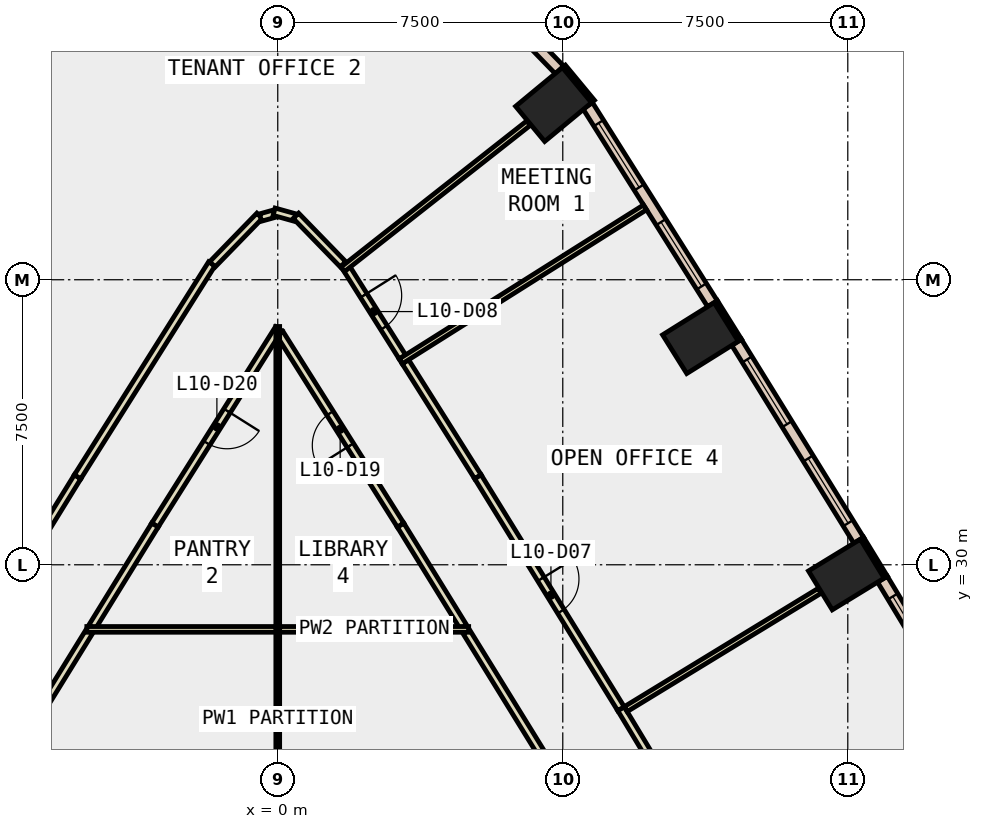
"""IFC4 building model, lengths in metres.
Left out: names, types, materials, properties, quantities, classifications, styles, units other than length and angle.
Written with IfcOpenShell. Run it as: python <this file> out.ifc"""

import sys

from ifc_helpers import new_model, si_unit, direction, frame, frame_2d, origin, origin_2d, place, context, subcontext, project, spatial, rectangle, extrude, element, fill, save


model = new_model("IFC4")
c1 = context("Model", 3, precision=1e-05, world=origin(), true_north=direction((0.0, 1.0)))
c2 = subcontext(c1, "Body", "Model", "MODEL_VIEW")
j1 = project(units=[si_unit("LENGTHUNIT", "METRE"), si_unit("PLANEANGLEUNIT", "RADIAN")], contexts=[c1])
p1 = place(None, origin())
s1 = spatial("IfcSite", under=j1, at=p1, CompositionType="ELEMENT")
p2 = place(p1, origin())
s2 = spatial("IfcBuilding", under=s1, at=p2, CompositionType="ELEMENT")
p3 = place(p2, frame((0.0, 0.0, 51.8)))
s3 = spatial("IfcBuildingStorey", under=s2, at=p3, CompositionType="ELEMENT", Elevation=51.8)
for number, where, z_axis, x_axis in (
    (1, (14.961, 29.743, -0.4), (0.0, 0.0, 1.0), (-0.522, 0.853, 0.0)),
    (2, (11.123, 35.965, -0.4), (0.0, 0.0, 1.0), (-0.53, 0.848, 0.0)),
    (3, (7.258, 42.111, -0.4), (0.0, 0.0, 1.0), (-0.638, 0.77, 0.0)),
):
    element("IfcColumn", number, at=place(p3, frame(where, z_axis=z_axis, x_axis=x_axis)), inside=s3, PredefinedType="COLUMN", context=c2, shape_type="SweptSolid", body=[
        extrude(rectangle(XDim=1.2, YDim=1.6, at=origin_2d()), origin(), (0.0, 0.0, 1.0), 4.2),
    ])
p4 = place(p3, frame((15.999, 29.674, 0.0), z_axis=(0.0, 0.0, 1.0), x_axis=(-0.521598117945, 0.853191305251, 0.0)))
e4 = element("IfcWall", 4, at=p4, inside=s3, PredefinedType="STANDARD", context=c2, shape_type="SweptSolid", body=[
    extrude(rectangle(XDim=1.2, YDim=0.1, at=frame_2d((0.6, 0.0))), origin(), (0.0, 0.0, 1.0), 3.8),
])
p5 = place(p3, frame((12.162, 35.907, 0.0), z_axis=(0.0, 0.0, 1.0), x_axis=(-0.530328162925, 0.847792450785, 0.0)))
e5 = element("IfcWall", 5, at=p5, inside=s3, PredefinedType="STANDARD", context=c2, shape_type="SweptSolid", body=[
    extrude(rectangle(XDim=1.2, YDim=0.1, at=frame_2d((0.6, 0.0))), origin(), (0.0, 0.0, 1.0), 3.8),
])
p6 = place(p3, frame((8.295, 42.191, 0.0), z_axis=(0.0, 0.0, 1.0), x_axis=(-0.637638520791, 0.770335716947, 0.0)))
e6 = element("IfcWall", 6, at=p6, inside=s3, PredefinedType="STANDARD", context=c2, shape_type="SweptSolid", body=[
    extrude(rectangle(XDim=1.199, YDim=0.1, at=frame_2d((0.6, 0.0))), origin(), (0.0, 0.0, 1.0), 3.8),
])
p7 = place(p3, frame((19.074, 24.38, 0.0), z_axis=(0.0, 0.0, 1.0), x_axis=(-0.516699243123, 0.856166976796, 0.0)))
e7 = element("IfcWall", 7, at=p7, inside=s3, PredefinedType="STANDARD", context=c2, shape_type="SweptSolid", body=[
    extrude(rectangle(XDim=6.122, YDim=0.3, at=frame_2d((3.061, 0.0))), origin(), (0.0, 0.0, 1.0), 3.8),
])
p8 = place(p7, frame((0.53, 0.0, 0.9)))
e8 = element("IfcOpeningElement", 8, at=p8, cuts=e7, PredefinedType="OPENING", context=c2, shape_type="SweptSolid", body=[
    extrude(rectangle(XDim=2.0, YDim=2.6, at=frame_2d((1.0, 1.3))), frame((0.0, 0.16, 0.0), z_axis=(0.0, -1.0, 0.0), x_axis=(1.0, 0.0, 0.0)), (0.0, 0.0, 1.0), 0.32),
])
p9 = place(p7, frame((3.591, 0.0, 0.9)))
e9 = element("IfcOpeningElement", 9, at=p9, cuts=e7, PredefinedType="OPENING", context=c2, shape_type="SweptSolid", body=[
    extrude(rectangle(XDim=2.0, YDim=2.6, at=frame_2d((1.0, 1.3))), frame((0.0, 0.16, 0.0), z_axis=(0.0, -1.0, 0.0), x_axis=(1.0, 0.0, 0.0)), (0.0, 0.0, 1.0), 0.32),
])
p10 = place(p3, frame((15.287, 30.644, 0.0), z_axis=(0.0, 0.0, 1.0), x_axis=(-0.525114088226, 0.851031840971, 0.0)))
e10 = element("IfcWall", 10, at=p10, inside=s3, PredefinedType="STANDARD", context=c2, shape_type="SweptSolid", body=[
    extrude(rectangle(XDim=6.121, YDim=0.3, at=frame_2d((3.061, 0.0))), origin(), (0.0, 0.0, 1.0), 3.8),
])
p11 = place(p10, frame((0.53, 0.0, 0.9)))
e11 = element("IfcOpeningElement", 11, at=p11, cuts=e10, PredefinedType="OPENING", context=c2, shape_type="SweptSolid", body=[
    extrude(rectangle(XDim=2.0, YDim=2.6, at=frame_2d((1.0, 1.3))), frame((0.0, 0.16, 0.0), z_axis=(0.0, -1.0, 0.0), x_axis=(1.0, 0.0, 0.0)), (0.0, 0.0, 1.0), 0.32),
])
p12 = place(p10, frame((3.591, 0.0, 0.9)))
e12 = element("IfcOpeningElement", 12, at=p12, cuts=e10, PredefinedType="OPENING", context=c2, shape_type="SweptSolid", body=[
    extrude(rectangle(XDim=2.0, YDim=2.6, at=frame_2d((1.0, 1.3))), frame((0.0, 0.16, 0.0), z_axis=(0.0, -1.0, 0.0), x_axis=(1.0, 0.0, 0.0)), (0.0, 0.0, 1.0), 0.32),
])
p13 = place(p3, frame((11.439, 36.869, 0.0), z_axis=(0.0, 0.0, 1.0), x_axis=(-0.533075127321, 0.846067910177, 0.0)))
e13 = element("IfcWall", 13, at=p13, inside=s3, PredefinedType="STANDARD", context=c2, shape_type="SweptSolid", body=[
    extrude(rectangle(XDim=6.157, YDim=0.3, at=frame_2d((3.078, 0.0))), origin(), (0.0, 0.0, 1.0), 3.8),
])
p14 = place(p13, frame((0.539, 0.0, 0.9)))
e14 = element("IfcOpeningElement", 14, at=p14, cuts=e13, PredefinedType="OPENING", context=c2, shape_type="SweptSolid", body=[
    extrude(rectangle(XDim=2.0, YDim=2.6, at=frame_2d((1.0, 1.3))), frame((0.0, 0.16, 0.0), z_axis=(0.0, -1.0, 0.0), x_axis=(1.0, 0.0, 0.0)), (0.0, 0.0, 1.0), 0.32),
])
p15 = place(p13, frame((3.618, 0.0, 0.9)))
e15 = element("IfcOpeningElement", 15, at=p15, cuts=e13, PredefinedType="OPENING", context=c2, shape_type="SweptSolid", body=[
    extrude(rectangle(XDim=2.0, YDim=2.6, at=frame_2d((1.0, 1.3))), frame((0.0, 0.16, 0.0), z_axis=(0.0, -1.0, 0.0), x_axis=(1.0, 0.0, 0.0)), (0.0, 0.0, 1.0), 0.32),
])
p16 = place(p3, frame((7.416, 43.02, 0.0), z_axis=(0.0, 0.0, 1.0), x_axis=(-0.696939827977, 0.717129609052, 0.0)))
e16 = element("IfcWall", 16, at=p16, inside=s3, PredefinedType="STANDARD", context=c2, shape_type="SweptSolid", body=[
    extrude(rectangle(XDim=3.422, YDim=0.3, at=frame_2d((1.711, 0.0))), origin(), (0.0, 0.0, 1.0), 3.8),
])
p17 = place(p16, frame((1.011, 0.0, 0.9)))
e17 = element("IfcOpeningElement", 17, at=p17, cuts=e16, PredefinedType="OPENING", context=c2, shape_type="SweptSolid", body=[
    extrude(rectangle(XDim=1.4, YDim=2.6, at=frame_2d((0.7, 1.3))), frame((0.0, 0.16, 0.0), z_axis=(0.0, -1.0, 0.0), x_axis=(1.0, 0.0, 0.0)), (0.0, 0.0, 1.0), 0.32),
])
p18 = place(p3, frame((-5.031, 45.474, 0.0), z_axis=(0.0, 0.0, 1.0), x_axis=(-0.696939827977, -0.717129609052, 0.0)))
e18 = element("IfcWall", 18, at=p18, inside=s3, PredefinedType="STANDARD", context=c2, shape_type="SweptSolid", body=[
    extrude(rectangle(XDim=3.422, YDim=0.3, at=frame_2d((1.711, 0.0))), origin(), (0.0, 0.0, 1.0), 3.8),
])
p19 = place(p18, frame((1.011, 0.0, 0.9)))
e19 = element("IfcOpeningElement", 19, at=p19, cuts=e18, PredefinedType="OPENING", context=c2, shape_type="SweptSolid", body=[
    extrude(rectangle(XDim=1.4, YDim=2.6, at=frame_2d((0.7, 1.3))), frame((0.0, 0.16, 0.0), z_axis=(0.0, -1.0, 0.0), x_axis=(1.0, 0.0, 0.0)), (0.0, 0.0, 1.0), 0.32),
])
for number, where, z_axis, x_axis in (
    (20, (7.022, 24.899, 0.0), (0.0, 0.0, 1.0), (-0.525, 0.851, 0.0)),
    (21, (-4.963, 28.236, 0.0), (0.0, 0.0, 1.0), (-0.525, -0.851, 0.0)),
):
    element("IfcWall", number, at=place(p3, frame(where, z_axis=z_axis, x_axis=x_axis)), inside=s3, PredefinedType="PARTITIONING", context=c2, shape_type="SweptSolid", body=[
        extrude(rectangle(XDim=3.921, YDim=0.2, at=frame_2d((1.961, 0.0))), origin(), (0.0, 0.0, 1.0), 3.8),
    ])
p20 = place(p3, frame((4.885, 28.364, 0.0), z_axis=(0.0, 0.0, 1.0), x_axis=(-0.525078663571, 0.851053698107, 0.0)))
e22 = element("IfcWall", 22, at=p20, inside=s3, PredefinedType="PARTITIONING", context=c2, shape_type="SweptSolid", body=[
    extrude(rectangle(XDim=3.15, YDim=0.2, at=frame_2d((1.575, 0.0))), origin(), (0.0, 0.0, 1.0), 3.8),
])
p21 = place(p3, frame((3.231, 31.045, 0.0), z_axis=(0.0, 0.0, 1.0), x_axis=(-0.533294550084, 0.845929620507, 0.0)))
e23 = element("IfcWall", 23, at=p21, inside=s3, PredefinedType="PARTITIONING", context=c2, shape_type="SweptSolid", body=[
    extrude(rectangle(XDim=5.959, YDim=0.2, at=frame_2d((2.979, 0.0))), origin(), (0.0, 0.0, 1.0), 3.8),
])
p22 = place(p21, frame((2.479, 0.0, 0.0)))
e24 = element("IfcOpeningElement", 24, at=p22, cuts=e23, PredefinedType="OPENING", context=c2, shape_type="SweptSolid", body=[
    extrude(rectangle(XDim=1.0, YDim=2.1, at=frame_2d((0.5, 1.05))), frame((0.0, 0.11, 0.0), z_axis=(0.0, -1.0, 0.0), x_axis=(1.0, 0.0, 0.0)), (0.0, 0.0, 1.0), 0.22),
])
p23 = place(p3, frame((0.027, 36.213, 0.0), z_axis=(0.0, 0.0, 1.0), x_axis=(-0.533299680037, -0.845926386438, 0.0)))
e25 = element("IfcWall", 25, at=p23, inside=s3, PredefinedType="PARTITIONING", context=c2, shape_type="SweptSolid", body=[
    extrude(rectangle(XDim=6.109, YDim=0.2, at=frame_2d((3.055, 0.0))), origin(), (0.0, 0.0, 1.0), 3.8),
])
p24 = place(p23, frame((2.554, 0.0, 0.0)))
e26 = element("IfcOpeningElement", 26, at=p24, cuts=e25, PredefinedType="OPENING", context=c2, shape_type="SweptSolid", body=[
    extrude(rectangle(XDim=1.0, YDim=2.1, at=frame_2d((0.5, 1.05))), frame((0.0, 0.11, 0.0), z_axis=(0.0, -1.0, 0.0), x_axis=(1.0, 0.0, 0.0)), (0.0, 0.0, 1.0), 0.22),
])
p25 = place(p3, frame((-3.231, 31.045, 0.0), z_axis=(0.0, 0.0, 1.0), x_axis=(-0.525078663571, -0.851053698107, 0.0)))
e27 = element("IfcWall", 27, at=p25, inside=s3, PredefinedType="PARTITIONING", context=c2, shape_type="SweptSolid", body=[
    extrude(rectangle(XDim=3.15, YDim=0.2, at=frame_2d((1.575, 0.0))), origin(), (0.0, 0.0, 1.0), 3.8),
])
p26 = place(p3, frame((9.032, 26.213, 0.0), z_axis=(0.0, 0.0, 1.0), x_axis=(0.516789314756, -0.856112611841, 0.0)))
e28 = element("IfcWall", 28, at=p26, inside=s3, PredefinedType="PARTITIONING", context=c2, shape_type="SweptSolid", body=[
    extrude(rectangle(XDim=7.32, YDim=0.2, at=frame_2d((3.66, 0.0))), origin(), (0.0, 0.0, 1.0), 3.8),
])
p27 = place(p26, frame((3.16, 0.0, 0.0)))
e29 = element("IfcOpeningElement", 29, at=p27, cuts=e28, PredefinedType="OPENING", context=c2, shape_type="SweptSolid", body=[
    extrude(rectangle(XDim=1.0, YDim=2.1, at=frame_2d((0.5, 1.05))), frame((0.0, 0.11, 0.0), z_axis=(0.0, -1.0, 0.0), x_axis=(1.0, 0.0, 0.0)), (0.0, 0.0, 1.0), 0.22),
])
p28 = place(p3, frame((3.359, 35.341, 0.0), z_axis=(0.0, 0.0, 1.0), x_axis=(0.533386910893, -0.845871386966, 0.0)))
e30 = element("IfcWall", 30, at=p28, inside=s3, PredefinedType="PARTITIONING", context=c2, shape_type="SweptSolid", body=[
    extrude(rectangle(XDim=3.578, YDim=0.2, at=frame_2d((1.789, 0.0))), origin(), (0.0, 0.0, 1.0), 3.8),
])
p29 = place(p3, frame((5.267, 32.315, 0.0), z_axis=(0.0, 0.0, 1.0), x_axis=(0.524988204957, -0.851109502153, 0.0)))
e31 = element("IfcWall", 31, at=p29, inside=s3, PredefinedType="PARTITIONING", context=c2, shape_type="SweptSolid", body=[
    extrude(rectangle(XDim=7.169, YDim=0.2, at=frame_2d((3.585, 0.0))), origin(), (0.0, 0.0, 1.0), 3.8),
])
p30 = place(p29, frame((3.16, 0.0, 0.0)))
e32 = element("IfcOpeningElement", 32, at=p30, cuts=e31, PredefinedType="OPENING", context=c2, shape_type="SweptSolid", body=[
    extrude(rectangle(XDim=1.0, YDim=2.1, at=frame_2d((0.5, 1.05))), frame((0.0, 0.11, 0.0), z_axis=(0.0, -1.0, 0.0), x_axis=(1.0, 0.0, 0.0)), (0.0, 0.0, 1.0), 0.22),
])
p31 = place(p3, frame((1.775, 37.856, 0.0), z_axis=(0.0, 0.0, 1.0), x_axis=(0.533221537001, -0.845975645322, 0.0)))
e33 = element("IfcWall", 33, at=p31, inside=s3, PredefinedType="PARTITIONING", context=c2, shape_type="SweptSolid", body=[
    extrude(rectangle(XDim=2.823, YDim=0.2, at=frame_2d((1.411, 0.0))), origin(), (0.0, 0.0, 1.0), 3.8),
])
p32 = place(p31, frame((0.911, 0.0, 0.0)))
e34 = element("IfcOpeningElement", 34, at=p32, cuts=e33, PredefinedType="OPENING", context=c2, shape_type="SweptSolid", body=[
    extrude(rectangle(XDim=1.0, YDim=2.1, at=frame_2d((0.5, 1.05))), frame((0.0, 0.11, 0.0), z_axis=(0.0, -1.0, 0.0), x_axis=(1.0, 0.0, 0.0)), (0.0, 0.0, 1.0), 0.22),
])
p33 = place(p3, frame((-9.11, 26.085, 0.0), z_axis=(0.0, 0.0, 1.0), x_axis=(0.525007100846, 0.85109784635, 0.0)))
e35 = element("IfcWall", 35, at=p33, inside=s3, PredefinedType="PARTITIONING", context=c2, shape_type="SweptSolid", body=[
    extrude(rectangle(XDim=7.32, YDim=0.2, at=frame_2d((3.66, 0.0))), origin(), (0.0, 0.0, 1.0), 3.8),
])
p34 = place(p33, frame((3.16, 0.0, 0.0)))
e36 = element("IfcOpeningElement", 36, at=p34, cuts=e35, PredefinedType="OPENING", context=c2, shape_type="SweptSolid", body=[
    extrude(rectangle(XDim=1.0, YDim=2.1, at=frame_2d((0.5, 1.05))), frame((0.0, 0.11, 0.0), z_axis=(0.0, -1.0, 0.0), x_axis=(1.0, 0.0, 0.0)), (0.0, 0.0, 1.0), 0.22),
])
p35 = place(p3, frame((-5.267, 32.315, 0.0), z_axis=(0.0, 0.0, 1.0), x_axis=(0.533195424135, 0.845992103794, 0.0)))
e37 = element("IfcWall", 37, at=p35, inside=s3, PredefinedType="PARTITIONING", context=c2, shape_type="SweptSolid", body=[
    extrude(rectangle(XDim=6.624, YDim=0.2, at=frame_2d((3.312, 0.0))), origin(), (0.0, 0.0, 1.0), 3.8),
])
p36 = place(p3, frame((-1.718, 37.906, 0.0), z_axis=(0.0, 0.0, 1.0), x_axis=(0.696949052806, 0.71712064382, 0.0)))
e38 = element("IfcWall", 38, at=p36, inside=s3, PredefinedType="PARTITIONING", context=c2, shape_type="SweptSolid", body=[
    extrude(rectangle(XDim=1.779, YDim=0.2, at=frame_2d((0.89, 0.0))), origin(), (0.0, 0.0, 1.0), 3.8),
])
p37 = place(p3, frame((-0.452, 39.137, 0.0), z_axis=(0.0, 0.0, 1.0), x_axis=(0.963347325023, 0.26825721122, 0.0)))
e39 = element("IfcWall", 39, at=p37, inside=s3, PredefinedType="PARTITIONING", context=c2, shape_type="SweptSolid", body=[
    extrude(rectangle(XDim=0.369, YDim=0.2, at=frame_2d((0.185, 0.0))), origin(), (0.0, 0.0, 1.0), 3.8),
])
p38 = place(p3, frame((-0.096, 39.29, 0.0), z_axis=(0.0, 0.0, 1.0), x_axis=(0.963110974003, -0.269104536854, 0.0)))
e40 = element("IfcWall", 40, at=p38, inside=s3, PredefinedType="PARTITIONING", context=c2, shape_type="SweptSolid", body=[
    extrude(rectangle(XDim=0.569, YDim=0.2, at=frame_2d((0.284, 0.0))), origin(), (0.0, 0.0, 1.0), 3.8),
])
p39 = place(p3, frame((0.478, 39.182, 0.0), z_axis=(0.0, 0.0, 1.0), x_axis=(0.696949052806, -0.71712064382, 0.0)))
e41 = element("IfcWall", 41, at=p39, inside=s3, PredefinedType="PARTITIONING", context=c2, shape_type="SweptSolid", body=[
    extrude(rectangle(XDim=1.779, YDim=0.2, at=frame_2d((0.89, 0.0))), origin(), (0.0, 0.0, 1.0), 3.8),
])
p40 = place(p3, frame((0.0, 23.5, 0.0), z_axis=(0.0, 0.0, 1.0), x_axis=(0.0, 1.0, 0.0)))
e42 = element("IfcWall", 42, at=p40, inside=s3, PredefinedType="PARTITIONING", context=c2, shape_type="SweptSolid", body=[
    extrude(rectangle(XDim=4.875, YDim=0.1, at=frame_2d((2.438, 0.0))), origin(), (0.0, 0.0, 1.0), 3.8),
])
for number, where, z_axis, x_axis in (
    (43, (0.05, 28.3, 0.0), (0.0, 0.0, 1.0), (1.0, 0.0, 0.0)),
    (44, (-5.024, 28.3, 0.0), (0.0, 0.0, 1.0), (1.0, 0.0, 0.0)),
):
    element("IfcWall", number, at=place(p3, frame(where, z_axis=z_axis, x_axis=x_axis)), inside=s3, PredefinedType="PARTITIONING", context=c2, shape_type="SweptSolid", body=[
        extrude(rectangle(XDim=4.974, YDim=0.15, at=frame_2d((2.487, 0.0))), origin(), (0.0, 0.0, 1.0), 3.8),
    ])
p41 = place(p3, frame((0.0, 28.375, 0.0), z_axis=(0.0, 0.0, 1.0), x_axis=(0.0, 1.0, 0.0)))
e45 = element("IfcWall", 45, at=p41, inside=s3, PredefinedType="PARTITIONING", context=c2, shape_type="SweptSolid", body=[
    extrude(rectangle(XDim=7.895, YDim=0.1, at=frame_2d((3.948, 0.0))), origin(), (0.0, 0.0, 1.0), 3.8),
])
p42 = place(p3, frame((9.156, 26.201, 0.0), z_axis=(0.0, 0.0, 1.0), x_axis=(0.853632819511, 0.520875234057, 0.0)))
e46 = element("IfcWall", 46, at=p42, inside=s3, PredefinedType="PARTITIONING", context=c2, shape_type="SweptSolid", body=[
    extrude(rectangle(XDim=5.98, YDim=0.15, at=frame_2d((2.99, 0.0))), origin(), (0.0, 0.0, 1.0), 3.8),
])
p43 = place(p3, frame((3.235, 35.352, 0.0), z_axis=(0.0, 0.0, 1.0), x_axis=(0.845987036055, 0.533203464755, 0.0)))
e47 = element("IfcWall", 47, at=p43, inside=s3, PredefinedType="PARTITIONING", context=c2, shape_type="SweptSolid", body=[
    extrude(rectangle(XDim=7.599, YDim=0.15, at=frame_2d((3.8, 0.0))), origin(), (0.0, 0.0, 1.0), 3.8),
])
p44 = place(p3, frame((1.709, 37.773, 0.0), z_axis=(0.0, 0.0, 1.0), x_axis=(0.785857956092, 0.618407044629, 0.0)))
e48 = element("IfcWall", 48, at=p44, inside=s3, PredefinedType="PARTITIONING", context=c2, shape_type="SweptSolid", body=[
    extrude(rectangle(XDim=6.223, YDim=0.15, at=frame_2d((3.111, 0.0))), origin(), (0.0, 0.0, 1.0), 3.8),
])
p45 = place(p9, origin())
e49 = element("IfcWindow", 49, at=p45, inside=s3, PartitioningType="SINGLE_PANEL", PredefinedType="WINDOW", context=c2, shape_type="SweptSolid", body=[
    extrude(rectangle(XDim=2.0, YDim=2.6, at=frame_2d((1.0, 1.3))), frame((0.0, 0.03, 0.0), z_axis=(0.0, -1.0, 0.0), x_axis=(1.0, 0.0, 0.0)), (0.0, 0.0, 1.0), 0.06),
])
fill(e9, e49)
p46 = place(p11, origin())
e50 = element("IfcWindow", 50, at=p46, inside=s3, PartitioningType="SINGLE_PANEL", PredefinedType="WINDOW", context=c2, shape_type="SweptSolid", body=[
    extrude(rectangle(XDim=2.0, YDim=2.6, at=frame_2d((1.0, 1.3))), frame((0.0, 0.03, 0.0), z_axis=(0.0, -1.0, 0.0), x_axis=(1.0, 0.0, 0.0)), (0.0, 0.0, 1.0), 0.06),
])
fill(e11, e50)
p47 = place(p12, origin())
e51 = element("IfcWindow", 51, at=p47, inside=s3, PartitioningType="SINGLE_PANEL", PredefinedType="WINDOW", context=c2, shape_type="SweptSolid", body=[
    extrude(rectangle(XDim=2.0, YDim=2.6, at=frame_2d((1.0, 1.3))), frame((0.0, 0.03, 0.0), z_axis=(0.0, -1.0, 0.0), x_axis=(1.0, 0.0, 0.0)), (0.0, 0.0, 1.0), 0.06),
])
fill(e12, e51)
p48 = place(p14, origin())
e52 = element("IfcWindow", 52, at=p48, inside=s3, PartitioningType="SINGLE_PANEL", PredefinedType="WINDOW", context=c2, shape_type="SweptSolid", body=[
    extrude(rectangle(XDim=2.0, YDim=2.6, at=frame_2d((1.0, 1.3))), frame((0.0, 0.03, 0.0), z_axis=(0.0, -1.0, 0.0), x_axis=(1.0, 0.0, 0.0)), (0.0, 0.0, 1.0), 0.06),
])
fill(e14, e52)
p49 = place(p15, origin())
e53 = element("IfcWindow", 53, at=p49, inside=s3, PartitioningType="SINGLE_PANEL", PredefinedType="WINDOW", context=c2, shape_type="SweptSolid", body=[
    extrude(rectangle(XDim=2.0, YDim=2.6, at=frame_2d((1.0, 1.3))), frame((0.0, 0.03, 0.0), z_axis=(0.0, -1.0, 0.0), x_axis=(1.0, 0.0, 0.0)), (0.0, 0.0, 1.0), 0.06),
])
fill(e15, e53)
p50 = place(p30, origin())
e54 = element("IfcDoor", 54, at=p50, inside=s3, OperationType="SINGLE_SWING_RIGHT", PredefinedType="DOOR", context=c2, shape_type="SweptSolid", body=[
    extrude(rectangle(XDim=1.0, YDim=2.1, at=frame_2d((0.5, 1.05))), frame((0.0, 0.025, 0.0), z_axis=(0.0, -1.0, 0.0), x_axis=(1.0, 0.0, 0.0)), (0.0, 0.0, 1.0), 0.05),
])
fill(e32, e54)
p51 = place(p32, origin())
e55 = element("IfcDoor", 55, at=p51, inside=s3, OperationType="SINGLE_SWING_LEFT", PredefinedType="DOOR", context=c2, shape_type="SweptSolid", body=[
    extrude(rectangle(XDim=1.0, YDim=2.1, at=frame_2d((0.5, 1.05))), frame((0.0, 0.025, 0.0), z_axis=(0.0, -1.0, 0.0), x_axis=(1.0, 0.0, 0.0)), (0.0, 0.0, 1.0), 0.05),
])
fill(e34, e55)
p52 = place(p22, origin())
e56 = element("IfcDoor", 56, at=p52, inside=s3, OperationType="SINGLE_SWING_LEFT", PredefinedType="DOOR", context=c2, shape_type="SweptSolid", body=[
    extrude(rectangle(XDim=1.0, YDim=2.1, at=frame_2d((0.5, 1.05))), frame((0.0, 0.025, 0.0), z_axis=(0.0, -1.0, 0.0), x_axis=(1.0, 0.0, 0.0)), (0.0, 0.0, 1.0), 0.05),
])
fill(e24, e56)
p53 = place(p24, origin())
e57 = element("IfcDoor", 57, at=p53, inside=s3, OperationType="SINGLE_SWING_LEFT", PredefinedType="DOOR", context=c2, shape_type="SweptSolid", body=[
    extrude(rectangle(XDim=1.0, YDim=2.1, at=frame_2d((0.5, 1.05))), frame((0.0, 0.025, 0.0), z_axis=(0.0, -1.0, 0.0), x_axis=(1.0, 0.0, 0.0)), (0.0, 0.0, 1.0), 0.05),
])
fill(e26, e57)
save(model, sys.argv[1])
